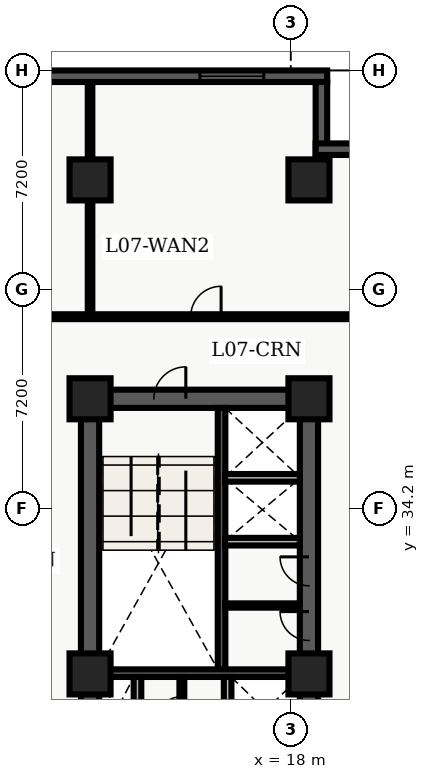
"""IFC4 building model, lengths in metres.
Left out: names, types, materials, properties, quantities, classifications, styles, units other than length and angle.
Written with IfcOpenShell. Run it as: python <this file> out.ifc"""

import sys

from ifc_helpers import new_model, entity, si_unit, converted_unit, direction, frame, origin_with_axes, origin_2d_with_axis, place, context, subcontext, project, spatial, polyline, rectangle, outline, extrude, element, fill, save


model = new_model("IFC4")
c1 = context("Model", 3, precision=1e-05, world=origin_with_axes(), true_north=direction((0.0, 1.0)))
c2 = subcontext(c1, "Body", "Model", "MODEL_VIEW")
j1 = project(units=[si_unit("LENGTHUNIT", "METRE"), converted_unit("PLANEANGLEUNIT", "DEGREE", entity("IfcPlaneAngleMeasure", 0.017), si_unit("PLANEANGLEUNIT", "RADIAN"), dimensions=[0, 0, 0, 0, 0, 0, 0])], contexts=[c1])
p1 = place(None, origin_with_axes())
s1 = spatial("IfcSite", under=j1, at=p1, CompositionType="ELEMENT")
p2 = place(p1, origin_with_axes())
s2 = spatial("IfcBuilding", under=s1, at=p2, CompositionType="ELEMENT")
p3 = place(p2, frame((0.0, 0.0, 32.7), z_axis=(0.0, 0.0, 1.0), x_axis=(1.0, 0.0, 0.0)))
s3 = spatial("IfcBuildingStorey", under=s2, at=p3, CompositionType="ELEMENT", Elevation=32.7)
p4 = place(p3, frame((11.4, 10.8, 0.0), z_axis=(0.0, 0.0, 1.0), x_axis=(0.0, 1.0, 0.0)))
e1 = element("IfcWall", 1, at=p4, inside=s3, PredefinedType="SHEAR", context=c2, shape_type="SweptSolid", body=[
    extrude(outline(polyline([(0.0, -0.3), (27.0, -0.3), (27.0, 0.3), (0.0, 0.3), (0.0, -0.3)])), origin_with_axes(), (0.0, 0.0, 1.0), 3.66),
])
p5 = place(p3, frame((11.4, 37.8, 0.0), z_axis=(0.0, 0.0, 1.0), x_axis=(1.0, 0.0, 0.0)))
e2 = element("IfcWall", 2, at=p5, inside=s3, PredefinedType="SHEAR", context=c2, shape_type="SweptSolid", body=[
    extrude(outline(polyline([(0.0, -0.3), (7.2, -0.3), (7.2, 0.3), (0.0, 0.3), (0.0, -0.3)])), origin_with_axes(), (0.0, 0.0, 1.0), 3.66),
])
p6 = place(p5, frame((2.625, 0.0, 0.0), z_axis=(0.0, 0.0, 1.0), x_axis=(1.0, 0.0, 0.0)))
e3 = element("IfcOpeningElement", 3, at=p6, cuts=e2, PredefinedType="OPENING", context=c2, shape_type="SweptSolid", body=[
    extrude(rectangle(XDim=1.05, YDim=0.62, at=origin_2d_with_axis()), origin_with_axes(), (0.0, 0.0, 1.0), 2.15),
])
p7 = place(p3, frame((18.6, 24.3, 0.0), z_axis=(0.0, 0.0, 1.0), x_axis=(0.0, 1.0, 0.0)))
e4 = element("IfcWall", 4, at=p7, inside=s3, PredefinedType="SHEAR", context=c2, shape_type="SweptSolid", body=[
    extrude(outline(polyline([(0.0, -0.3), (13.5, -0.3), (13.5, 0.3), (0.0, 0.3), (0.0, -0.3)])), origin_with_axes(), (0.0, 0.0, 1.0), 3.66),
])
p8 = place(p7, frame((6.025, 0.0, 0.0), z_axis=(0.0, 0.0, 1.0), x_axis=(1.0, 0.0, 0.0)))
e5 = element("IfcOpeningElement", 5, at=p8, cuts=e4, PredefinedType="OPENING", context=c2, shape_type="SweptSolid", body=[
    extrude(rectangle(XDim=0.95, YDim=0.62, at=origin_2d_with_axis()), origin_with_axes(), (0.0, 0.0, 1.0), 2.15),
])
p9 = place(p7, frame((7.825, 0.0, 0.0), z_axis=(0.0, 0.0, 1.0), x_axis=(1.0, 0.0, 0.0)))
e6 = element("IfcOpeningElement", 6, at=p9, cuts=e4, PredefinedType="OPENING", context=c2, shape_type="SweptSolid", body=[
    extrude(rectangle(XDim=0.95, YDim=0.62, at=origin_2d_with_axis()), origin_with_axes(), (0.0, 0.0, 1.0), 2.15),
])
p10 = place(p3, frame((15.725, 28.9, 0.0), z_axis=(0.0, 0.0, 1.0), x_axis=(0.0, 1.0, 0.0)))
e7 = element("IfcWall", 7, at=p10, inside=s3, PredefinedType="SHEAR", context=c2, shape_type="SweptSolid", body=[
    extrude(outline(polyline([(0.0, -0.125), (8.6, -0.125), (8.6, 0.125), (0.0, 0.125), (0.0, -0.125)])), origin_with_axes(), (0.0, 0.0, 1.0), 3.66),
])
p11 = place(p3, frame((11.7, 28.775, 0.0), z_axis=(0.0, 0.0, 1.0), x_axis=(1.0, 0.0, 0.0)))
e8 = element("IfcWall", 8, at=p11, inside=s3, PredefinedType="SHEAR", context=c2, shape_type="SweptSolid", body=[
    extrude(outline(polyline([(0.0, -0.125), (6.6, -0.125), (6.6, 0.125), (0.0, 0.125), (0.0, -0.125)])), origin_with_axes(), (0.0, 0.0, 1.0), 3.66),
])
for number, where, z_axis, x_axis in (
    (9, (12.96, 26.45, 0.0), (0.0, 0.0, 1.0), (0.0, 1.0, 0.0)),
    (10, (15.925, 26.45, 0.0), (0.0, 0.0, 1.0), (0.0, 1.0, 0.0)),
):
    element("IfcWall", number, at=place(p3, frame(where, z_axis=z_axis, x_axis=x_axis)), inside=s3, PredefinedType="SOLIDWALL", context=c2, shape_type="SweptSolid", body=[
        extrude(outline(polyline([(0.0, -0.125), (2.2, -0.125), (2.2, 0.125), (0.0, 0.125), (0.0, -0.125)])), origin_with_axes(), (0.0, 0.0, 1.0), 2.7),
    ])
for number, where, z_axis, x_axis in (
    (11, (11.4, 28.75, 0.0), (0.0, 0.0, 1.0), (1.0, 0.0, 0.0)),
    (12, (11.4, 37.8, 0.0), (0.0, 0.0, 1.0), (1.0, 0.0, 0.0)),
    (13, (11.4, 45.0, 0.0), (0.0, 0.0, 1.0), (1.0, 0.0, 0.0)),
    (14, (18.6, 28.75, 0.0), (0.0, 0.0, 1.0), (1.0, 0.0, 0.0)),
    (15, (18.6, 37.8, 0.0), (0.0, 0.0, 1.0), (1.0, 0.0, 0.0)),
    (16, (18.6, 45.0, 0.0), (0.0, 0.0, 1.0), (1.0, 0.0, 0.0)),
):
    element("IfcColumn", number, at=place(p3, frame(where, z_axis=z_axis, x_axis=x_axis)), inside=s3, PredefinedType="COLUMN", context=c2, shape_type="SweptSolid", body=[
        extrude(rectangle(XDim=1.35, YDim=1.35, at=origin_2d_with_axis()), origin_with_axes(), (0.0, 0.0, 1.0), 3.9),
    ])
p12 = place(p3, frame((14.42, 26.45, 0.0), z_axis=(0.0, 0.0, 1.0), x_axis=(0.0, 1.0, 0.0)))
e17 = element("IfcWall", 17, at=p12, inside=s3, PredefinedType="PARTITIONING", context=c2, shape_type="SweptSolid", body=[
    extrude(outline(polyline([(0.0, -0.08), (2.2, -0.08), (2.2, 0.08), (0.0, 0.08), (0.0, -0.08)])), origin_with_axes(), (0.0, 0.0, 1.0), 2.7),
])
p13 = place(p12, frame((1.1, 0.0, 0.0), z_axis=(0.0, 0.0, 1.0), x_axis=(1.0, 0.0, 0.0)))
e18 = element("IfcOpeningElement", 18, at=p13, cuts=e17, PredefinedType="OPENING", context=c2, shape_type="SweptSolid", body=[
    extrude(rectangle(XDim=0.9, YDim=0.18, at=origin_2d_with_axis()), origin_with_axes(), (0.0, 0.0, 1.0), 2.15),
])
for number, where, z_axis, x_axis in (
    (19, (15.84, 33.1, 0.0), (0.0, 0.0, 1.0), (1.0, 0.0, 0.0)),
    (20, (15.84, 35.2, 0.0), (0.0, 0.0, 1.0), (1.0, 0.0, 0.0)),
):
    element("IfcWall", number, at=place(p3, frame(where, z_axis=z_axis, x_axis=x_axis)), inside=s3, PredefinedType="SOLIDWALL", context=c2, shape_type="SweptSolid", body=[
        extrude(outline(polyline([(0.0, -0.125), (2.46, -0.125), (2.46, 0.125), (0.0, 0.125), (0.0, -0.125)])), origin_with_axes(), (0.0, 0.0, 1.0), 2.7),
    ])
p14 = place(p3, frame((15.84, 31.0, 0.0), z_axis=(0.0, 0.0, 1.0), x_axis=(1.0, 0.0, 0.0)))
e21 = element("IfcWall", 21, at=p14, inside=s3, PredefinedType="PARTITIONING", context=c2, shape_type="SweptSolid", body=[
    extrude(outline(polyline([(0.0, -0.07), (2.46, -0.07), (2.46, 0.07), (0.0, 0.07), (0.0, -0.07)])), origin_with_axes(), (0.0, 0.0, 1.0), 2.7),
])
p15 = place(p3, frame((2.6, 40.5, 0.0), z_axis=(0.0, 0.0, 1.0), x_axis=(1.0, 0.0, 0.0)))
e22 = element("IfcWall", 22, at=p15, inside=s3, PredefinedType="PARTITIONING", context=c2, shape_type="SweptSolid", body=[
    extrude(outline(polyline([(0.0, -0.08), (18.65, -0.08), (18.65, 0.08), (0.0, 0.08), (0.0, -0.08)])), origin_with_axes(), (0.0, 0.0, 1.0), 2.7),
])
p16 = place(p15, frame((4.395, 0.0, 0.0), z_axis=(0.0, 0.0, 1.0), x_axis=(1.0, 0.0, 0.0)))
e23 = element("IfcOpeningElement", 23, at=p16, cuts=e22, PredefinedType="OPENING", context=c2, shape_type="SweptSolid", body=[
    extrude(rectangle(XDim=1.2, YDim=0.18, at=origin_2d_with_axis()), origin_with_axes(), (0.0, 0.0, 1.0), 2.2),
])
p17 = place(p15, frame((12.61, 0.0, 0.0), z_axis=(0.0, 0.0, 1.0), x_axis=(1.0, 0.0, 0.0)))
e24 = element("IfcOpeningElement", 24, at=p17, cuts=e22, PredefinedType="OPENING", context=c2, shape_type="SweptSolid", body=[
    extrude(rectangle(XDim=1.0, YDim=0.18, at=origin_2d_with_axis()), origin_with_axes(), (0.0, 0.0, 1.0), 2.15),
])
p18 = place(p3, frame((11.4, 40.6, 0.0), z_axis=(0.0, 0.0, 1.0), x_axis=(0.0, 1.0, 0.0)))
e25 = element("IfcWall", 25, at=p18, inside=s3, PredefinedType="PARTITIONING", context=c2, shape_type="SweptSolid", body=[
    extrude(outline(polyline([(0.0, -0.075), (7.64, -0.075), (7.64, 0.075), (0.0, 0.075), (0.0, -0.075)])), origin_with_axes(), (0.0, 0.0, 1.0), 2.7),
])
p19 = place(p3, frame((2.78, 48.41, 0.0), z_axis=(0.0, 0.0, 1.0), x_axis=(1.0, 0.0, 0.0)))
e26 = element("IfcWall", 26, at=p19, inside=s3, PredefinedType="SOLIDWALL", context=c2, shape_type="SweptSolid", body=[
    extrude(outline(polyline([(0.0, -0.19), (16.42, -0.19), (16.42, 0.19), (0.0, 0.19), (0.0, -0.19)])), origin_with_axes(), (0.0, 0.0, 1.0), 3.66),
])
p20 = place(p19, frame((3.137, 0.0, 0.45), z_axis=(0.0, 0.0, 1.0), x_axis=(1.0, 0.0, 0.0)))
e27 = element("IfcOpeningElement", 27, at=p20, cuts=e26, PredefinedType="OPENING", context=c2, shape_type="SweptSolid", body=[
    extrude(rectangle(XDim=2.1, YDim=0.4, at=origin_2d_with_axis()), origin_with_axes(), (0.0, 0.0, 1.0), 2.2),
])
p21 = place(p19, frame((13.283, 0.0, 0.45), z_axis=(0.0, 0.0, 1.0), x_axis=(1.0, 0.0, 0.0)))
e28 = element("IfcOpeningElement", 28, at=p21, cuts=e26, PredefinedType="OPENING", context=c2, shape_type="SweptSolid", body=[
    extrude(rectangle(XDim=2.1, YDim=0.4, at=origin_2d_with_axis()), origin_with_axes(), (0.0, 0.0, 1.0), 2.2),
])
p22 = place(p3, frame((19.01, 48.22, 0.0), z_axis=(0.0, 0.0, 1.0), x_axis=(0.0, -1.0, 0.0)))
e29 = element("IfcWall", 29, at=p22, inside=s3, PredefinedType="SOLIDWALL", context=c2, shape_type="SweptSolid", body=[
    extrude(outline(polyline([(0.0, -0.19), (2.56, -0.19), (2.56, 0.19), (0.0, 0.19), (0.0, -0.19)])), origin_with_axes(), (0.0, 0.0, 1.0), 3.66),
])
p23 = place(p3, frame((18.82, 46.01, 0.0), z_axis=(0.0, 0.0, 1.0), x_axis=(1.0, 0.0, 0.0)))
e30 = element("IfcWall", 30, at=p23, inside=s3, PredefinedType="SOLIDWALL", context=c2, shape_type="SweptSolid", body=[
    extrude(outline(polyline([(0.0, -0.19), (2.78, -0.19), (2.78, 0.19), (0.0, 0.19), (0.0, -0.19)])), origin_with_axes(), (0.0, 0.0, 1.0), 3.66),
])
p24 = place(p5, frame((2.625, 0.0, 0.0), z_axis=(0.0, 0.0, 1.0), x_axis=(1.0, 0.0, 0.0)))
e31 = element("IfcDoor", 31, at=p24, inside=s3, OperationType="SINGLE_SWING_RIGHT", PredefinedType="DOOR", context=c2, shape_type="SweptSolid", body=[
    extrude(rectangle(XDim=1.05, YDim=0.09, at=origin_2d_with_axis()), origin_with_axes(), (0.0, 0.0, 1.0), 2.15),
])
fill(e3, e31)
p25 = place(p12, frame((1.1, 0.0, 0.0), z_axis=(0.0, 0.0, 1.0), x_axis=(1.0, 0.0, 0.0)))
e32 = element("IfcDoor", 32, at=p25, inside=s3, OperationType="SINGLE_SWING_LEFT", PredefinedType="DOOR", context=c2, shape_type="SweptSolid", body=[
    extrude(rectangle(XDim=0.9, YDim=0.09, at=origin_2d_with_axis()), origin_with_axes(), (0.0, 0.0, 1.0), 2.15),
])
fill(e18, e32)
p26 = place(p7, frame((6.025, 0.0, 0.0), z_axis=(0.0, 0.0, 1.0), x_axis=(1.0, 0.0, 0.0)))
e33 = element("IfcDoor", 33, at=p26, inside=s3, OperationType="SINGLE_SWING_RIGHT", PredefinedType="DOOR", context=c2, shape_type="SweptSolid", body=[
    extrude(rectangle(XDim=0.95, YDim=0.09, at=origin_2d_with_axis()), origin_with_axes(), (0.0, 0.0, 1.0), 2.15),
])
fill(e5, e33)
p27 = place(p7, frame((7.825, 0.0, 0.0), z_axis=(0.0, 0.0, 1.0), x_axis=(1.0, 0.0, 0.0)))
e34 = element("IfcDoor", 34, at=p27, inside=s3, OperationType="SINGLE_SWING_RIGHT", PredefinedType="DOOR", context=c2, shape_type="SweptSolid", body=[
    extrude(rectangle(XDim=0.95, YDim=0.09, at=origin_2d_with_axis()), origin_with_axes(), (0.0, 0.0, 1.0), 2.15),
])
fill(e6, e34)
p28 = place(p15, frame((12.61, 0.0, 0.0), z_axis=(0.0, 0.0, 1.0), x_axis=(1.0, 0.0, 0.0)))
e35 = element("IfcDoor", 35, at=p28, inside=s3, OperationType="SINGLE_SWING_RIGHT", PredefinedType="DOOR", context=c2, shape_type="SweptSolid", body=[
    extrude(rectangle(XDim=1.0, YDim=0.09, at=origin_2d_with_axis()), origin_with_axes(), (0.0, 0.0, 1.0), 2.15),
])
fill(e24, e35)
p29 = place(p19, frame((13.283, 0.0, 0.45), z_axis=(0.0, 0.0, 1.0), x_axis=(1.0, 0.0, 0.0)))
e36 = element("IfcWindow", 36, at=p29, inside=s3, PredefinedType="WINDOW", context=c2, shape_type="SweptSolid", body=[
    extrude(rectangle(XDim=2.1, YDim=0.09, at=origin_2d_with_axis()), origin_with_axes(), (0.0, 0.0, 1.0), 2.2),
])
fill(e28, e36)
save(model, sys.argv[1])
